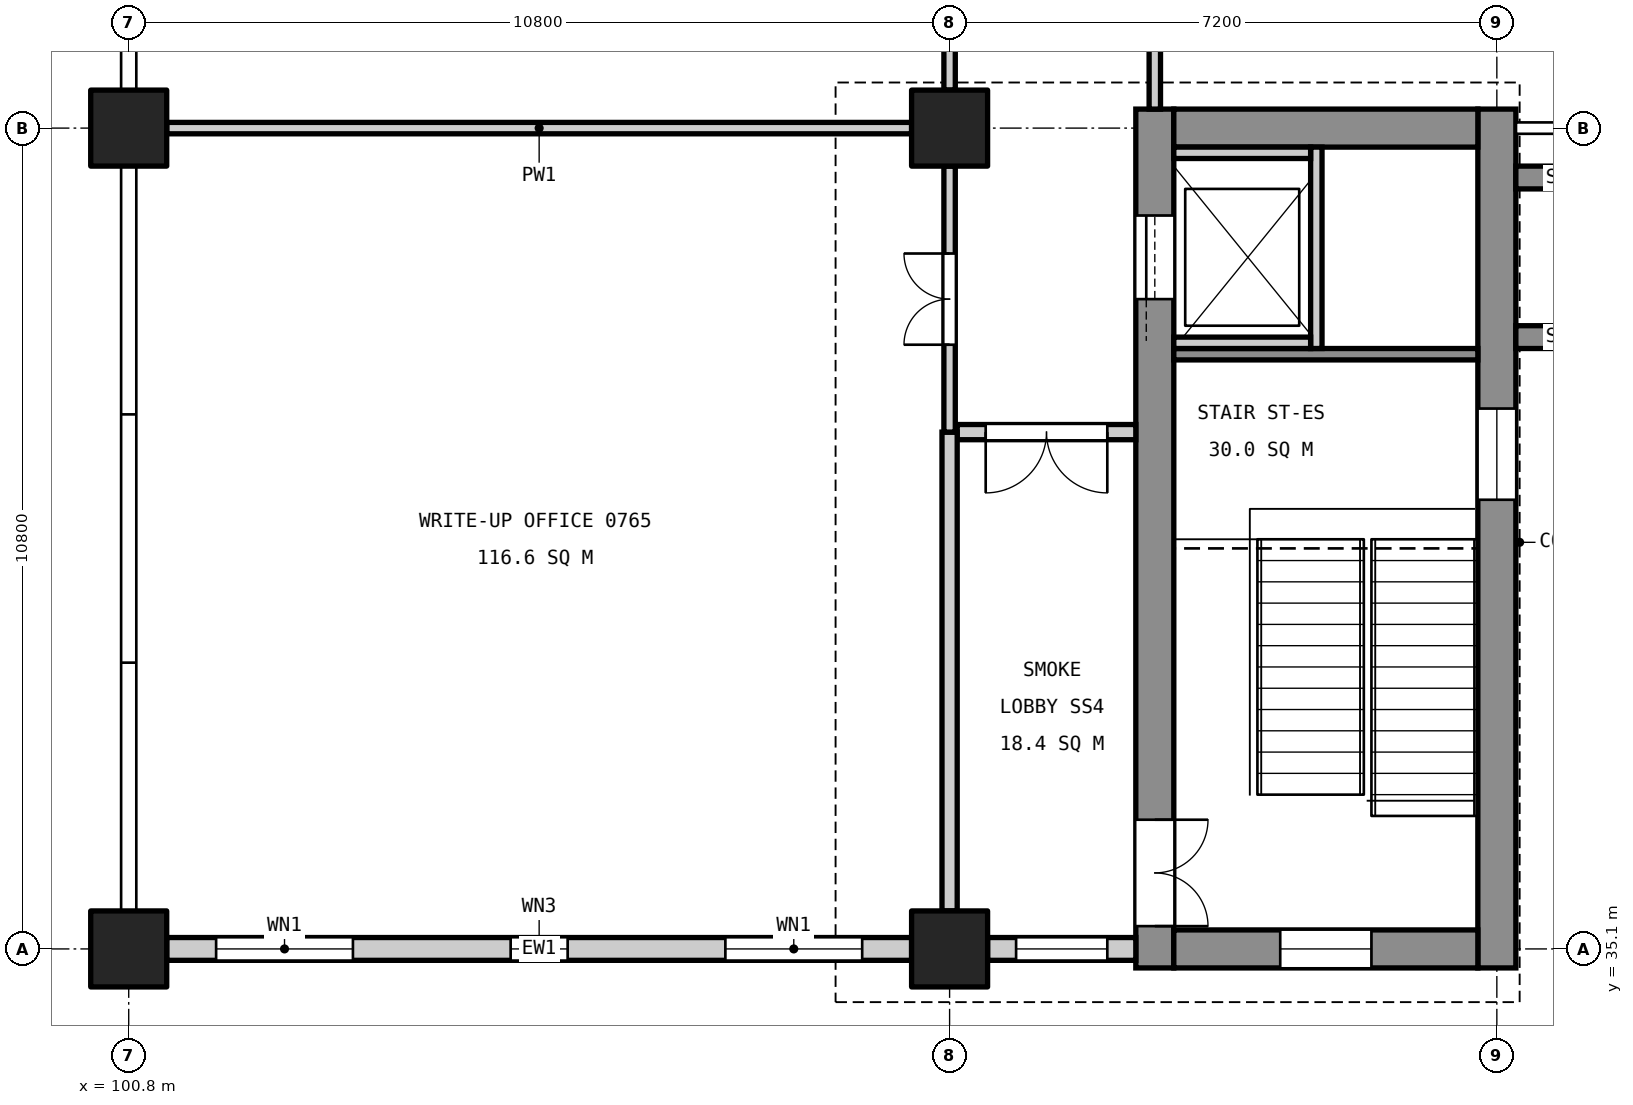
"""IFC4 building model, lengths in metres.
Left out: names, types, materials, properties, quantities, classifications, styles, units other than length and angle.
Written with IfcOpenShell. Run it as: python <this file> out.ifc"""

import sys

from ifc_helpers import new_model, si_unit, direction, frame, frame_2d, origin, origin_2d, place, context, subcontext, project, spatial, rectangle, extrude, element, fill, save


model = new_model("IFC4")
c1 = context("Model", 3, precision=1e-05, world=origin(), true_north=direction((0.0, 1.0)))
c2 = subcontext(c1, "Body", "Model", "MODEL_VIEW")
j1 = project(units=[si_unit("LENGTHUNIT", "METRE"), si_unit("PLANEANGLEUNIT", "RADIAN")], contexts=[c1])
p1 = place(None, origin())
s1 = spatial("IfcSite", under=j1, at=p1, CompositionType="ELEMENT")
p2 = place(p1, origin())
s2 = spatial("IfcBuilding", under=s1, at=p2, CompositionType="ELEMENT")
p3 = place(p2, frame((0.0, 0.0, 36.6)))
s3 = spatial("IfcBuildingStorey", under=s2, at=p3, CompositionType="ELEMENT", Elevation=36.6)
for number, where, z_axis, x_axis in (
    (1, (111.6, 35.1, 0.0), (0.0, 0.0, 1.0), (1.0, 0.0, 0.0)),
    (2, (111.6, 45.9, 0.0), (0.0, 0.0, 1.0), (1.0, 0.0, 0.0)),
    (3, (100.8, 35.1, 0.0), (0.0, 0.0, 1.0), (1.0, 0.0, 0.0)),
    (4, (100.8, 45.9, 0.0), (0.0, 0.0, 1.0), (1.0, 0.0, 0.0)),
):
    element("IfcColumn", number, at=place(p3, frame(where, z_axis=z_axis, x_axis=x_axis)), inside=s3, PredefinedType="COLUMN", context=c2, shape_type="SweptSolid", body=[
        extrude(rectangle(XDim=1.0, YDim=1.0, at=origin_2d()), origin(), (0.0, 0.0, 1.0), 4.8),
    ])
p4 = place(p3, frame((118.8, 34.85, 0.0), z_axis=(0.0, 0.0, 1.0), x_axis=(0.0, 1.0, 0.0)))
e5 = element("IfcWall", 5, at=p4, inside=s3, PredefinedType="SHEAR", context=c2, shape_type="SweptSolid", body=[
    extrude(rectangle(XDim=11.3, YDim=0.5, at=frame_2d((5.65, 0.0))), origin(), (0.0, 0.0, 1.0), 4.55),
])
p5 = place(p4, frame((6.16, 0.0, 3.4)))
e6 = element("IfcOpeningElement", 6, at=p5, cuts=e5, PredefinedType="OPENING", context=c2, shape_type="SweptSolid", body=[
    extrude(rectangle(XDim=1.2, YDim=0.9, at=frame_2d((0.6, 0.45))), frame((0.0, 0.26, 0.0), z_axis=(0.0, -1.0, 0.0), x_axis=(1.0, 0.0, 0.0)), (0.0, 0.0, 1.0), 0.52),
])
p6 = place(p3, frame((114.3, 34.85, 0.0), z_axis=(0.0, 0.0, 1.0), x_axis=(0.0, 1.0, 0.0)))
e7 = element("IfcWall", 7, at=p6, inside=s3, PredefinedType="SHEAR", context=c2, shape_type="SweptSolid", body=[
    extrude(rectangle(XDim=11.3, YDim=0.5, at=frame_2d((5.65, 0.0))), origin(), (0.0, 0.0, 1.0), 4.55),
])
p7 = place(p6, frame((0.55, 0.0, 0.0)))
e8 = element("IfcOpeningElement", 8, at=p7, cuts=e7, PredefinedType="OPENING", context=c2, shape_type="SweptSolid", body=[
    extrude(rectangle(XDim=1.4, YDim=2.1, at=frame_2d((0.7, 1.05))), frame((0.0, 0.26, 0.0), z_axis=(0.0, -1.0, 0.0), x_axis=(1.0, 0.0, 0.0)), (0.0, 0.0, 1.0), 0.52),
])
p8 = place(p6, frame((8.8, 0.0, 0.0)))
e9 = element("IfcOpeningElement", 9, at=p8, cuts=e7, PredefinedType="OPENING", context=c2, shape_type="SweptSolid", body=[
    extrude(rectangle(XDim=1.1, YDim=2.1, at=frame_2d((0.55, 1.05))), frame((0.0, 0.26, 0.0), z_axis=(0.0, -1.0, 0.0), x_axis=(1.0, 0.0, 0.0)), (0.0, 0.0, 1.0), 0.52),
])
p9 = place(p3, frame((118.55, 35.1, 0.0), z_axis=(0.0, 0.0, 1.0), x_axis=(-1.0, 0.0, 0.0)))
e10 = element("IfcWall", 10, at=p9, inside=s3, PredefinedType="SHEAR", context=c2, shape_type="SweptSolid", body=[
    extrude(rectangle(XDim=4.0, YDim=0.5, at=frame_2d((2.0, 0.0))), origin(), (0.0, 0.0, 1.0), 4.55),
])
p10 = place(p9, frame((1.4, 0.0, 3.4)))
e11 = element("IfcOpeningElement", 11, at=p10, cuts=e10, PredefinedType="OPENING", context=c2, shape_type="SweptSolid", body=[
    extrude(rectangle(XDim=1.2, YDim=0.9, at=frame_2d((0.6, 0.45))), frame((0.0, 0.26, 0.0), z_axis=(0.0, -1.0, 0.0), x_axis=(1.0, 0.0, 0.0)), (0.0, 0.0, 1.0), 0.52),
])
p11 = place(p3, frame((118.55, 45.9, 0.0), z_axis=(0.0, 0.0, 1.0), x_axis=(-1.0, 0.0, 0.0)))
e12 = element("IfcWall", 12, at=p11, inside=s3, PredefinedType="SHEAR", context=c2, shape_type="SweptSolid", body=[
    extrude(rectangle(XDim=4.0, YDim=0.5, at=frame_2d((2.0, 0.0))), origin(), (0.0, 0.0, 1.0), 4.55),
])
for number, where, z_axis, x_axis in (
    (13, (119.05, 43.15, 0.0), (0.0, 0.0, 1.0), (1.0, 0.0, 0.0)),
    (14, (119.05, 45.25, 0.0), (0.0, 0.0, 1.0), (1.0, 0.0, 0.0)),
):
    element("IfcWall", number, at=place(p3, frame(where, z_axis=z_axis, x_axis=x_axis)), inside=s3, PredefinedType="SHEAR", context=c2, shape_type="SweptSolid", body=[
        extrude(rectangle(XDim=1.25, YDim=0.3, at=frame_2d((0.625, 0.0))), origin(), (0.0, 0.0, 1.0), 4.8),
    ])
p12 = place(p3, frame((118.55, 42.925, 0.0), z_axis=(0.0, 0.0, 1.0), x_axis=(-1.0, 0.0, 0.0)))
e15 = element("IfcWall", 15, at=p12, inside=s3, PredefinedType="SOLIDWALL", context=c2, shape_type="SweptSolid", body=[
    extrude(rectangle(XDim=4.0, YDim=0.15, at=frame_2d((2.0, 0.0))), origin(), (0.0, 0.0, 1.0), 4.55),
])
p13 = place(p3, frame((116.425, 43.0, 0.0), z_axis=(0.0, 0.0, 1.0), x_axis=(0.0, 1.0, 0.0)))
e16 = element("IfcWall", 16, at=p13, inside=s3, PredefinedType="SOLIDWALL", context=c2, shape_type="SweptSolid", body=[
    extrude(rectangle(XDim=2.65, YDim=0.15, at=frame_2d((1.325, 0.0))), origin(), (0.0, 0.0, 1.0), 4.8),
])
for number, where, z_axis, x_axis in (
    (17, (116.35, 43.075, 0.0), (0.0, 0.0, 1.0), (-1.0, 0.0, 0.0)),
    (18, (116.35, 45.575, 0.0), (0.0, 0.0, 1.0), (-1.0, 0.0, 0.0)),
):
    element("IfcWall", number, at=place(p3, frame(where, z_axis=z_axis, x_axis=x_axis)), inside=s3, PredefinedType="SOLIDWALL", context=c2, shape_type="SweptSolid", body=[
        extrude(rectangle(XDim=1.8, YDim=0.15, at=frame_2d((0.9, 0.0))), origin(), (0.0, 0.0, 1.0), 4.8),
    ])
p14 = place(p3, frame((114.05, 35.1, 0.0), z_axis=(0.0, 0.0, 1.0), x_axis=(-1.0, 0.0, 0.0)))
e19 = element("IfcWall", 19, at=p14, inside=s3, PredefinedType="STANDARD", context=c2, shape_type="SweptSolid", body=[
    extrude(rectangle(XDim=1.95, YDim=0.3, at=frame_2d((0.975, 0.0))), origin(), (0.0, 0.0, 1.0), 3.85),
])
p15 = place(p14, frame((0.375, 0.0, 0.9)))
e20 = element("IfcOpeningElement", 20, at=p15, cuts=e19, PredefinedType="OPENING", context=c2, shape_type="SweptSolid", body=[
    extrude(rectangle(XDim=1.2, YDim=2.4, at=frame_2d((0.6, 1.2))), frame((0.0, 0.16, 0.0), z_axis=(0.0, -1.0, 0.0), x_axis=(1.0, 0.0, 0.0)), (0.0, 0.0, 1.0), 0.32),
])
p16 = place(p3, frame((111.1, 35.1, 0.0), z_axis=(0.0, 0.0, 1.0), x_axis=(-1.0, 0.0, 0.0)))
e21 = element("IfcWall", 21, at=p16, inside=s3, PredefinedType="STANDARD", context=c2, shape_type="SweptSolid", body=[
    extrude(rectangle(XDim=9.8, YDim=0.3, at=frame_2d((4.9, 0.0))), origin(), (0.0, 0.0, 1.0), 3.85),
])
p17 = place(p16, frame((0.65, 0.0, 0.9)))
e22 = element("IfcOpeningElement", 22, at=p17, cuts=e21, PredefinedType="OPENING", context=c2, shape_type="SweptSolid", body=[
    extrude(rectangle(XDim=1.8, YDim=2.4, at=frame_2d((0.9, 1.2))), frame((0.0, 0.16, 0.0), z_axis=(0.0, -1.0, 0.0), x_axis=(1.0, 0.0, 0.0)), (0.0, 0.0, 1.0), 0.32),
])
p18 = place(p16, frame((4.525, 0.0, 0.8)))
e23 = element("IfcOpeningElement", 23, at=p18, cuts=e21, PredefinedType="OPENING", context=c2, shape_type="SweptSolid", body=[
    extrude(rectangle(XDim=0.75, YDim=1.2, at=frame_2d((0.375, 0.6))), frame((0.0, 0.16, 0.0), z_axis=(0.0, -1.0, 0.0), x_axis=(1.0, 0.0, 0.0)), (0.0, 0.0, 1.0), 0.32),
])
p19 = place(p16, frame((7.35, 0.0, 0.9)))
e24 = element("IfcOpeningElement", 24, at=p19, cuts=e21, PredefinedType="OPENING", context=c2, shape_type="SweptSolid", body=[
    extrude(rectangle(XDim=1.8, YDim=2.4, at=frame_2d((0.9, 1.2))), frame((0.0, 0.16, 0.0), z_axis=(0.0, -1.0, 0.0), x_axis=(1.0, 0.0, 0.0)), (0.0, 0.0, 1.0), 0.32),
])
p20 = place(p3, frame((114.3, 46.15, 0.0), z_axis=(0.0, 0.0, 1.0), x_axis=(0.0, 1.0, 0.0)))
e25 = element("IfcWall", 25, at=p20, inside=s3, PredefinedType="PARTITIONING", context=c2, shape_type="SweptSolid", body=[
    extrude(rectangle(XDim=10.4, YDim=0.15, at=frame_2d((5.2, 0.0))), origin(), (0.0, 0.0, 1.0), 3.55),
])
p21 = place(p20, frame((4.65, 0.0, 0.0)))
e26 = element("IfcOpeningElement", 26, at=p21, cuts=e25, PredefinedType="OPENING", context=c2, shape_type="SweptSolid", body=[
    extrude(rectangle(XDim=1.0, YDim=2.1, at=frame_2d((0.5, 1.05))), frame((0.0, 0.085, 0.0), z_axis=(0.0, -1.0, 0.0), x_axis=(1.0, 0.0, 0.0)), (0.0, 0.0, 1.0), 0.17),
])
p22 = place(p3, frame((114.05, 41.9, 0.0), z_axis=(0.0, 0.0, 1.0), x_axis=(-1.0, 0.0, 0.0)))
e27 = element("IfcWall", 27, at=p22, inside=s3, PredefinedType="PARTITIONING", context=c2, shape_type="SweptSolid", body=[
    extrude(rectangle(XDim=2.35, YDim=0.2, at=frame_2d((1.175, 0.0))), origin(), (0.0, 0.0, 1.0), 3.55),
])
p23 = place(p22, frame((0.375, 0.0, 0.0)))
e28 = element("IfcOpeningElement", 28, at=p23, cuts=e27, PredefinedType="OPENING", context=c2, shape_type="SweptSolid", body=[
    extrude(rectangle(XDim=1.6, YDim=2.1, at=frame_2d((0.8, 1.05))), frame((0.0, 0.11, 0.0), z_axis=(0.0, -1.0, 0.0), x_axis=(1.0, 0.0, 0.0)), (0.0, 0.0, 1.0), 0.22),
])
p24 = place(p3, frame((111.6, 35.6, 0.0), z_axis=(0.0, 0.0, 1.0), x_axis=(0.0, 1.0, 0.0)))
e29 = element("IfcWall", 29, at=p24, inside=s3, PredefinedType="PARTITIONING", context=c2, shape_type="SweptSolid", body=[
    extrude(rectangle(XDim=6.3, YDim=0.2, at=frame_2d((3.15, 0.0))), origin(), (0.0, 0.0, 1.0), 3.55),
])
p25 = place(p3, frame((111.6, 41.9, 0.0), z_axis=(0.0, 0.0, 1.0), x_axis=(0.0, 1.0, 0.0)))
e30 = element("IfcWall", 30, at=p25, inside=s3, PredefinedType="PARTITIONING", context=c2, shape_type="SweptSolid", body=[
    extrude(rectangle(XDim=3.5, YDim=0.15, at=frame_2d((1.75, 0.0))), origin(), (0.0, 0.0, 1.0), 3.55),
])
p26 = place(p25, frame((1.15, 0.0, 0.0)))
e31 = element("IfcOpeningElement", 31, at=p26, cuts=e30, PredefinedType="OPENING", context=c2, shape_type="SweptSolid", body=[
    extrude(rectangle(XDim=1.2, YDim=2.1, at=frame_2d((0.6, 1.05))), frame((0.0, 0.085, 0.0), z_axis=(0.0, -1.0, 0.0), x_axis=(1.0, 0.0, 0.0)), (0.0, 0.0, 1.0), 0.17),
])
p27 = place(p3, frame((111.6, 46.4, 0.0), z_axis=(0.0, 0.0, 1.0), x_axis=(0.0, 1.0, 0.0)))
e32 = element("IfcWall", 32, at=p27, inside=s3, PredefinedType="PARTITIONING", context=c2, shape_type="SweptSolid", body=[
    extrude(rectangle(XDim=9.8, YDim=0.15, at=frame_2d((4.9, 0.0))), origin(), (0.0, 0.0, 1.0), 3.55),
])
p28 = place(p27, frame((2.75, 0.0, 0.0)))
e33 = element("IfcOpeningElement", 33, at=p28, cuts=e32, PredefinedType="OPENING", context=c2, shape_type="SweptSolid", body=[
    extrude(rectangle(XDim=1.2, YDim=2.1, at=frame_2d((0.6, 1.05))), frame((0.0, 0.085, 0.0), z_axis=(0.0, -1.0, 0.0), x_axis=(1.0, 0.0, 0.0)), (0.0, 0.0, 1.0), 0.17),
])
p29 = place(p27, frame((7.65, 0.0, 0.0)))
e34 = element("IfcOpeningElement", 34, at=p29, cuts=e32, PredefinedType="OPENING", context=c2, shape_type="SweptSolid", body=[
    extrude(rectangle(XDim=1.2, YDim=2.1, at=frame_2d((0.6, 1.05))), frame((0.0, 0.085, 0.0), z_axis=(0.0, -1.0, 0.0), x_axis=(1.0, 0.0, 0.0)), (0.0, 0.0, 1.0), 0.17),
])
p30 = place(p3, frame((111.1, 45.9, 0.0), z_axis=(0.0, 0.0, 1.0), x_axis=(-1.0, 0.0, 0.0)))
e35 = element("IfcWall", 35, at=p30, inside=s3, PredefinedType="PARTITIONING", context=c2, shape_type="SweptSolid", body=[
    extrude(rectangle(XDim=9.8, YDim=0.15, at=frame_2d((4.9, 0.0))), origin(), (0.0, 0.0, 1.0), 3.85),
])
p31 = place(p7, frame((1.4, 0.0, 0.0), z_axis=(0.0, 0.0, 1.0), x_axis=(-1.0, 0.0, 0.0)))
e36 = element("IfcDoor", 36, at=p31, inside=s3, OperationType="DOUBLE_DOOR_SINGLE_SWING", PredefinedType="DOOR", context=c2, shape_type="SweptSolid", body=[
    extrude(rectangle(XDim=1.4, YDim=2.1, at=frame_2d((0.7, 1.05))), frame((0.0, 0.025, 0.0), z_axis=(0.0, -1.0, 0.0), x_axis=(1.0, 0.0, 0.0)), (0.0, 0.0, 1.0), 0.05),
])
fill(e8, e36)
p32 = place(p8, origin())
e37 = element("IfcDoor", 37, at=p32, inside=s3, OperationType="SLIDING_TO_LEFT", PredefinedType="DOOR", context=c2, shape_type="SweptSolid", body=[
    extrude(rectangle(XDim=1.1, YDim=2.1, at=frame_2d((0.55, 1.05))), frame((0.0, 0.025, 0.0), z_axis=(0.0, -1.0, 0.0), x_axis=(1.0, 0.0, 0.0)), (0.0, 0.0, 1.0), 0.05),
])
fill(e9, e37)
p33 = place(p15, origin())
e38 = element("IfcWindow", 38, at=p33, inside=s3, PartitioningType="SINGLE_PANEL", PredefinedType="WINDOW", context=c2, shape_type="SweptSolid", body=[
    extrude(rectangle(XDim=1.2, YDim=2.4, at=frame_2d((0.6, 1.2))), frame((0.0, 0.03, 0.0), z_axis=(0.0, -1.0, 0.0), x_axis=(1.0, 0.0, 0.0)), (0.0, 0.0, 1.0), 0.06),
])
fill(e20, e38)
p34 = place(p17, origin())
e39 = element("IfcWindow", 39, at=p34, inside=s3, PartitioningType="SINGLE_PANEL", PredefinedType="WINDOW", context=c2, shape_type="SweptSolid", body=[
    extrude(rectangle(XDim=1.8, YDim=2.4, at=frame_2d((0.9, 1.2))), frame((0.0, 0.03, 0.0), z_axis=(0.0, -1.0, 0.0), x_axis=(1.0, 0.0, 0.0)), (0.0, 0.0, 1.0), 0.06),
])
fill(e22, e39)
p35 = place(p18, origin())
e40 = element("IfcWindow", 40, at=p35, inside=s3, PartitioningType="SINGLE_PANEL", PredefinedType="WINDOW", context=c2, shape_type="SweptSolid", body=[
    extrude(rectangle(XDim=0.75, YDim=1.2, at=frame_2d((0.375, 0.6))), frame((0.0, 0.03, 0.0), z_axis=(0.0, -1.0, 0.0), x_axis=(1.0, 0.0, 0.0)), (0.0, 0.0, 1.0), 0.06),
])
fill(e23, e40)
p36 = place(p19, origin())
e41 = element("IfcWindow", 41, at=p36, inside=s3, PartitioningType="SINGLE_PANEL", PredefinedType="WINDOW", context=c2, shape_type="SweptSolid", body=[
    extrude(rectangle(XDim=1.8, YDim=2.4, at=frame_2d((0.9, 1.2))), frame((0.0, 0.03, 0.0), z_axis=(0.0, -1.0, 0.0), x_axis=(1.0, 0.0, 0.0)), (0.0, 0.0, 1.0), 0.06),
])
fill(e24, e41)
p37 = place(p5, origin())
e42 = element("IfcWindow", 42, at=p37, inside=s3, PartitioningType="SINGLE_PANEL", PredefinedType="WINDOW", context=c2, shape_type="SweptSolid", body=[
    extrude(rectangle(XDim=1.2, YDim=0.9, at=frame_2d((0.6, 0.45))), frame((0.0, 0.03, 0.0), z_axis=(0.0, -1.0, 0.0), x_axis=(1.0, 0.0, 0.0)), (0.0, 0.0, 1.0), 0.06),
])
fill(e6, e42)
p38 = place(p10, origin())
e43 = element("IfcWindow", 43, at=p38, inside=s3, PartitioningType="SINGLE_PANEL", PredefinedType="WINDOW", context=c2, shape_type="SweptSolid", body=[
    extrude(rectangle(XDim=1.2, YDim=0.9, at=frame_2d((0.6, 0.45))), frame((0.0, 0.03, 0.0), z_axis=(0.0, -1.0, 0.0), x_axis=(1.0, 0.0, 0.0)), (0.0, 0.0, 1.0), 0.06),
])
fill(e11, e43)
p39 = place(p26, origin())
e44 = element("IfcDoor", 44, at=p39, inside=s3, OperationType="DOUBLE_DOOR_SINGLE_SWING", PredefinedType="DOOR", context=c2, shape_type="SweptSolid", body=[
    extrude(rectangle(XDim=1.2, YDim=2.1, at=frame_2d((0.6, 1.05))), frame((0.0, 0.025, 0.0), z_axis=(0.0, -1.0, 0.0), x_axis=(1.0, 0.0, 0.0)), (0.0, 0.0, 1.0), 0.05),
])
fill(e31, e44)
p40 = place(p23, origin())
e45 = element("IfcDoor", 45, at=p40, inside=s3, OperationType="DOUBLE_DOOR_SINGLE_SWING", PredefinedType="DOOR", context=c2, shape_type="SweptSolid", body=[
    extrude(rectangle(XDim=1.6, YDim=2.1, at=frame_2d((0.8, 1.05))), frame((0.0, 0.025, 0.0), z_axis=(0.0, -1.0, 0.0), x_axis=(1.0, 0.0, 0.0)), (0.0, 0.0, 1.0), 0.05),
])
fill(e28, e45)
save(model, sys.argv[1])
